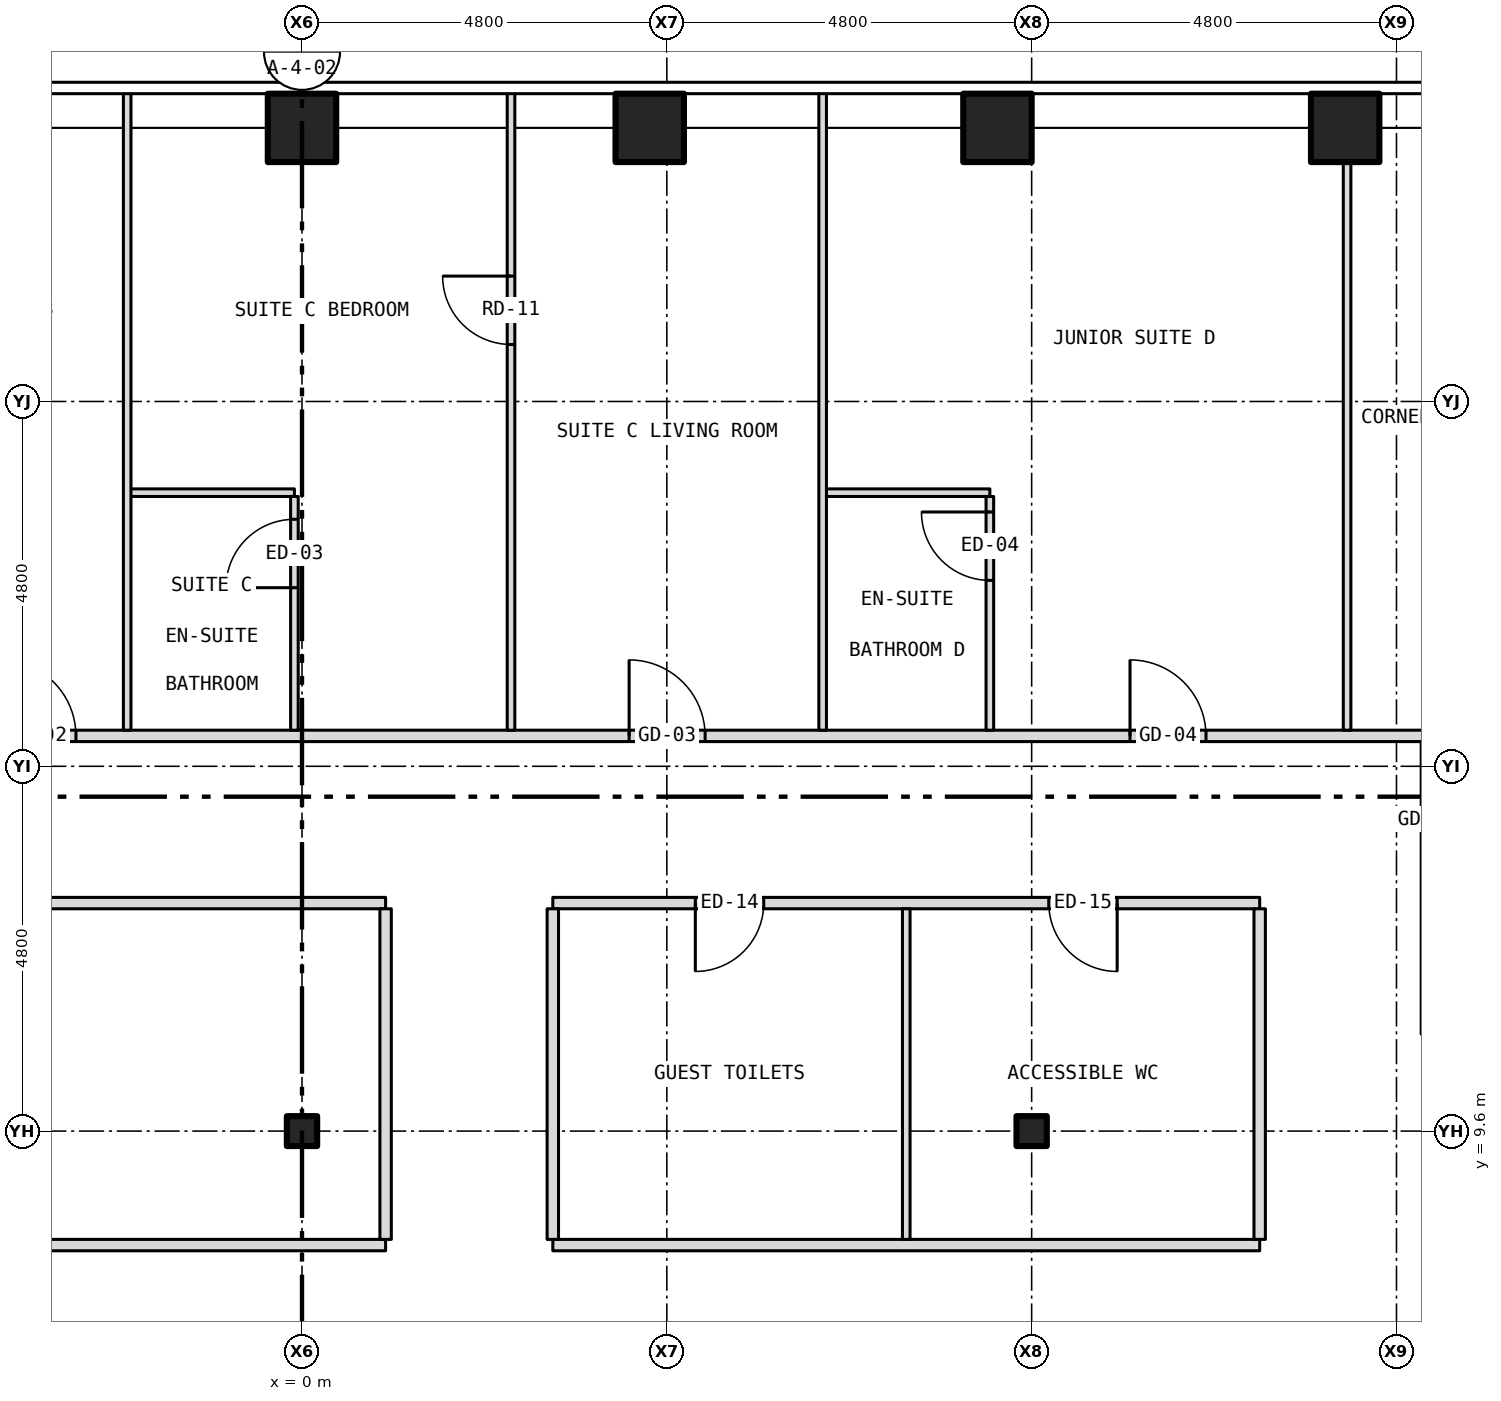
"""IFC4 building model, lengths in metres.
Left out: names, types, materials, properties, quantities, classifications, styles, units other than length and angle.
Written with IfcOpenShell. Run it as: python <this file> out.ifc"""

import sys

from ifc_helpers import new_model, si_unit, direction, frame, frame_2d, origin, origin_2d, place, context, subcontext, project, spatial, rectangle, hollow_rectangle, i_section, extrude, element, fill, save


model = new_model("IFC4")
c1 = context("Model", 3, precision=1e-05, world=origin(), true_north=direction((0.0, 1.0)))
c2 = subcontext(c1, "Body", "Model", "MODEL_VIEW")
j1 = project(units=[si_unit("LENGTHUNIT", "METRE"), si_unit("PLANEANGLEUNIT", "RADIAN")], contexts=[c1])
p1 = place(None, origin())
s1 = spatial("IfcSite", under=j1, at=p1, CompositionType="ELEMENT")
p2 = place(p1, origin())
s2 = spatial("IfcBuilding", under=s1, at=p2, CompositionType="ELEMENT")
p3 = place(p2, frame((0.0, 0.0, 92.5)))
s3 = spatial("IfcBuildingStorey", under=s2, at=p3, CompositionType="ELEMENT", Elevation=92.5)
for number, where, z_axis, x_axis in (
    (1, (0.0, 22.8, -0.15), (0.0, 0.0, 1.0), (1.0, 0.0, 0.0)),
    (2, (4.575, 22.8, -0.15), (0.0, 0.0, 1.0), (1.0, 0.0, 0.0)),
    (3, (9.15, 22.8, -0.15), (0.0, 0.0, 1.0), (1.0, 0.0, 0.0)),
    (4, (13.725, 22.8, -0.15), (0.0, 0.0, 1.0), (1.0, 0.0, 0.0)),
):
    element("IfcColumn", number, at=place(p3, frame(where, z_axis=z_axis, x_axis=x_axis)), inside=s3, PredefinedType="COLUMN", context=c2, shape_type="SweptSolid", body=[
        extrude(hollow_rectangle(XDim=0.9, YDim=0.9, WallThickness=0.05, at=origin_2d()), origin(), (0.0, 0.0, 1.0), 3.5),
    ])
for number, where, z_axis, x_axis in (
    (5, (0.0, 9.6, -0.15), (0.0, 0.0, 1.0), (1.0, 0.0, 0.0)),
    (6, (9.6, 9.6, -0.15), (0.0, 0.0, 1.0), (1.0, 0.0, 0.0)),
):
    element("IfcColumn", number, at=place(p3, frame(where, z_axis=z_axis, x_axis=x_axis)), inside=s3, PredefinedType="COLUMN", context=c2, shape_type="SweptSolid", body=[
        extrude(i_section(OverallWidth=0.399, OverallDepth=0.394, WebThickness=0.023, FlangeThickness=0.037, at=origin_2d()), origin(), (0.0, 0.0, 1.0), 3.5),
    ])
p4 = place(p3, frame((-12.6, 8.1, 0.0), z_axis=(0.0, 0.0, 1.0), x_axis=(1.0, 0.0, 0.0)))
e7 = element("IfcWall", 7, at=p4, inside=s3, PredefinedType="PARTITIONING", context=c2, shape_type="SweptSolid", body=[
    extrude(rectangle(XDim=13.7, YDim=0.15, at=frame_2d((6.85, 0.0))), origin(), (0.0, 0.0, 1.0), 3.35),
])
p5 = place(p4, frame((6.4, 0.0, 0.0)))
e8 = element("IfcOpeningElement", 8, at=p5, cuts=e7, PredefinedType="OPENING", context=c2, shape_type="SweptSolid", body=[
    extrude(rectangle(XDim=0.9, YDim=2.1, at=frame_2d((0.45, 1.05))), frame((0.0, 0.087, 0.0), z_axis=(0.0, -1.0, 0.0), x_axis=(1.0, 0.0, 0.0)), (0.0, 0.0, 1.0), 0.174),
])
p6 = place(p3, frame((3.3, 8.1, 0.0), z_axis=(0.0, 0.0, 1.0), x_axis=(1.0, 0.0, 0.0)))
e9 = element("IfcWall", 9, at=p6, inside=s3, PredefinedType="PARTITIONING", context=c2, shape_type="SweptSolid", body=[
    extrude(rectangle(XDim=9.3, YDim=0.15, at=frame_2d((4.65, 0.0))), origin(), (0.0, 0.0, 1.0), 3.35),
])
p7 = place(p3, frame((-12.6, 12.6, 0.0), z_axis=(0.0, 0.0, 1.0), x_axis=(1.0, 0.0, 0.0)))
e10 = element("IfcWall", 10, at=p7, inside=s3, PredefinedType="PARTITIONING", context=c2, shape_type="SweptSolid", body=[
    extrude(rectangle(XDim=13.7, YDim=0.15, at=frame_2d((6.85, 0.0))), origin(), (0.0, 0.0, 1.0), 3.35),
])
p8 = place(p3, frame((3.3, 12.6, 0.0), z_axis=(0.0, 0.0, 1.0), x_axis=(1.0, 0.0, 0.0)))
e11 = element("IfcWall", 11, at=p8, inside=s3, PredefinedType="PARTITIONING", context=c2, shape_type="SweptSolid", body=[
    extrude(rectangle(XDim=9.3, YDim=0.15, at=frame_2d((4.65, 0.0))), origin(), (0.0, 0.0, 1.0), 3.35),
])
p9 = place(p8, frame((1.875, 0.0, 0.0)))
e12 = element("IfcOpeningElement", 12, at=p9, cuts=e11, PredefinedType="OPENING", context=c2, shape_type="SweptSolid", body=[
    extrude(rectangle(XDim=0.9, YDim=2.1, at=frame_2d((0.45, 1.05))), frame((0.0, 0.087, 0.0), z_axis=(0.0, -1.0, 0.0), x_axis=(1.0, 0.0, 0.0)), (0.0, 0.0, 1.0), 0.174),
])
p10 = place(p8, frame((6.525, 0.0, 0.0)))
e13 = element("IfcOpeningElement", 13, at=p10, cuts=e11, PredefinedType="OPENING", context=c2, shape_type="SweptSolid", body=[
    extrude(rectangle(XDim=0.9, YDim=2.1, at=frame_2d((0.45, 1.05))), frame((0.0, 0.087, 0.0), z_axis=(0.0, -1.0, 0.0), x_axis=(1.0, 0.0, 0.0)), (0.0, 0.0, 1.0), 0.174),
])
p11 = place(p3, frame((-14.8, 14.8, 0.0), z_axis=(0.0, 0.0, 1.0), x_axis=(1.0, 0.0, 0.0)))
e14 = element("IfcWall", 14, at=p11, inside=s3, PredefinedType="PARTITIONING", context=c2, shape_type="SweptSolid", body=[
    extrude(rectangle(XDim=29.6, YDim=0.15, at=frame_2d((14.8, 0.0))), origin(), (0.0, 0.0, 1.0), 3.35),
])
p12 = place(p11, frame((5.107, 0.0, 0.0)))
e15 = element("IfcOpeningElement", 15, at=p12, cuts=e14, PredefinedType="OPENING", context=c2, shape_type="SweptSolid", body=[
    extrude(rectangle(XDim=1.0, YDim=2.1, at=frame_2d((0.5, 1.05))), frame((0.0, 0.087, 0.0), z_axis=(0.0, -1.0, 0.0), x_axis=(1.0, 0.0, 0.0)), (0.0, 0.0, 1.0), 0.174),
])
p13 = place(p11, frame((10.826, 0.0, 0.0)))
e16 = element("IfcOpeningElement", 16, at=p13, cuts=e14, PredefinedType="OPENING", context=c2, shape_type="SweptSolid", body=[
    extrude(rectangle(XDim=1.0, YDim=2.1, at=frame_2d((0.5, 1.05))), frame((0.0, 0.087, 0.0), z_axis=(0.0, -1.0, 0.0), x_axis=(1.0, 0.0, 0.0)), (0.0, 0.0, 1.0), 0.174),
])
p14 = place(p11, frame((19.104, 0.0, 0.0)))
e17 = element("IfcOpeningElement", 17, at=p14, cuts=e14, PredefinedType="OPENING", context=c2, shape_type="SweptSolid", body=[
    extrude(rectangle(XDim=1.0, YDim=2.1, at=frame_2d((0.5, 1.05))), frame((0.0, 0.087, 0.0), z_axis=(0.0, -1.0, 0.0), x_axis=(1.0, 0.0, 0.0)), (0.0, 0.0, 1.0), 0.174),
])
p15 = place(p11, frame((25.694, 0.0, 0.0)))
e18 = element("IfcOpeningElement", 18, at=p15, cuts=e14, PredefinedType="OPENING", context=c2, shape_type="SweptSolid", body=[
    extrude(rectangle(XDim=1.0, YDim=2.1, at=frame_2d((0.5, 1.05))), frame((0.0, 0.087, 0.0), z_axis=(0.0, -1.0, 0.0), x_axis=(1.0, 0.0, 0.0)), (0.0, 0.0, 1.0), 0.174),
])
for number, where, z_axis, x_axis in (
    (19, (-2.3, 18.0, 0.0), (0.0, 0.0, 1.0), (1.0, 0.0, 0.0)),
    (20, (6.85, 18.0, 0.0), (0.0, 0.0, 1.0), (1.0, 0.0, 0.0)),
):
    element("IfcWall", number, at=place(p3, frame(where, z_axis=z_axis, x_axis=x_axis)), inside=s3, PredefinedType="PARTITIONING", context=c2, shape_type="SweptSolid", body=[
        extrude(rectangle(XDim=2.2, YDim=0.1, at=frame_2d((1.1, 0.0))), origin(), (0.0, 0.0, 1.0), 3.35),
    ])
p16 = place(p3, frame((-2.3, 14.875, 0.0), z_axis=(0.0, 0.0, 1.0), x_axis=(0.0, 1.0, 0.0)))
e21 = element("IfcWall", 21, at=p16, inside=s3, PredefinedType="PARTITIONING", context=c2, shape_type="SweptSolid", body=[
    extrude(rectangle(XDim=8.405, YDim=0.1, at=frame_2d((4.203, 0.0))), origin(), (0.0, 0.0, 1.0), 3.35),
])
p17 = place(p3, frame((-0.1, 14.875, 0.0), z_axis=(0.0, 0.0, 1.0), x_axis=(0.0, 1.0, 0.0)))
e22 = element("IfcWall", 22, at=p17, inside=s3, PredefinedType="PARTITIONING", context=c2, shape_type="SweptSolid", body=[
    extrude(rectangle(XDim=3.075, YDim=0.1, at=frame_2d((1.538, 0.0))), origin(), (0.0, 0.0, 1.0), 2.728),
])
p18 = place(p17, frame((1.875, 0.0, 0.0)))
e23 = element("IfcOpeningElement", 23, at=p18, cuts=e22, PredefinedType="OPENING", context=c2, shape_type="SweptSolid", body=[
    extrude(rectangle(XDim=0.9, YDim=2.1, at=frame_2d((0.45, 1.05))), frame((0.0, 0.062, 0.0), z_axis=(0.0, -1.0, 0.0), x_axis=(1.0, 0.0, 0.0)), (0.0, 0.0, 1.0), 0.124),
])
p19 = place(p3, frame((1.1, 8.175, 0.0), z_axis=(0.0, 0.0, 1.0), x_axis=(0.0, 1.0, 0.0)))
e24 = element("IfcWall", 24, at=p19, inside=s3, PredefinedType="PARTITIONING", context=c2, shape_type="SweptSolid", body=[
    extrude(rectangle(XDim=4.35, YDim=0.15, at=frame_2d((2.175, 0.0))), origin(), (0.0, 0.0, 1.0), 3.35),
])
p20 = place(p3, frame((2.75, 14.875, 0.0), z_axis=(0.0, 0.0, 1.0), x_axis=(0.0, 1.0, 0.0)))
e25 = element("IfcWall", 25, at=p20, inside=s3, PredefinedType="PARTITIONING", context=c2, shape_type="SweptSolid", body=[
    extrude(rectangle(XDim=8.405, YDim=0.1, at=frame_2d((4.203, 0.0))), origin(), (0.0, 0.0, 1.0), 3.35),
])
p21 = place(p20, frame((5.075, 0.0, 0.0)))
e26 = element("IfcOpeningElement", 26, at=p21, cuts=e25, PredefinedType="OPENING", context=c2, shape_type="SweptSolid", body=[
    extrude(rectangle(XDim=0.9, YDim=2.1, at=frame_2d((0.45, 1.05))), frame((0.0, 0.062, 0.0), z_axis=(0.0, -1.0, 0.0), x_axis=(1.0, 0.0, 0.0)), (0.0, 0.0, 1.0), 0.124),
])
p22 = place(p3, frame((3.3, 8.175, 0.0), z_axis=(0.0, 0.0, 1.0), x_axis=(0.0, 1.0, 0.0)))
e27 = element("IfcWall", 27, at=p22, inside=s3, PredefinedType="PARTITIONING", context=c2, shape_type="SweptSolid", body=[
    extrude(rectangle(XDim=4.35, YDim=0.15, at=frame_2d((2.175, 0.0))), origin(), (0.0, 0.0, 1.0), 3.35),
])
p23 = place(p3, frame((6.85, 14.875, 0.0), z_axis=(0.0, 0.0, 1.0), x_axis=(0.0, 1.0, 0.0)))
e28 = element("IfcWall", 28, at=p23, inside=s3, PredefinedType="PARTITIONING", context=c2, shape_type="SweptSolid", body=[
    extrude(rectangle(XDim=8.405, YDim=0.1, at=frame_2d((4.203, 0.0))), origin(), (0.0, 0.0, 1.0), 3.35),
])
p24 = place(p3, frame((7.95, 8.175, 0.0), z_axis=(0.0, 0.0, 1.0), x_axis=(0.0, 1.0, 0.0)))
e29 = element("IfcWall", 29, at=p24, inside=s3, PredefinedType="PARTITIONING", context=c2, shape_type="SweptSolid", body=[
    extrude(rectangle(XDim=4.35, YDim=0.1, at=frame_2d((2.175, 0.0))), origin(), (0.0, 0.0, 1.0), 3.35),
])
p25 = place(p3, frame((9.05, 14.875, 0.0), z_axis=(0.0, 0.0, 1.0), x_axis=(0.0, 1.0, 0.0)))
e30 = element("IfcWall", 30, at=p25, inside=s3, PredefinedType="PARTITIONING", context=c2, shape_type="SweptSolid", body=[
    extrude(rectangle(XDim=3.075, YDim=0.1, at=frame_2d((1.538, 0.0))), origin(), (0.0, 0.0, 1.0), 3.35),
])
p26 = place(p25, frame((1.971, 0.0, 0.0)))
e31 = element("IfcOpeningElement", 31, at=p26, cuts=e30, PredefinedType="OPENING", context=c2, shape_type="SweptSolid", body=[
    extrude(rectangle(XDim=0.9, YDim=2.1, at=frame_2d((0.45, 1.05))), frame((0.0, 0.062, 0.0), z_axis=(0.0, -1.0, 0.0), x_axis=(1.0, 0.0, 0.0)), (0.0, 0.0, 1.0), 0.124),
])
p27 = place(p3, frame((12.6, 8.175, 0.0), z_axis=(0.0, 0.0, 1.0), x_axis=(0.0, 1.0, 0.0)))
e32 = element("IfcWall", 32, at=p27, inside=s3, PredefinedType="PARTITIONING", context=c2, shape_type="SweptSolid", body=[
    extrude(rectangle(XDim=4.35, YDim=0.15, at=frame_2d((2.175, 0.0))), origin(), (0.0, 0.0, 1.0), 3.35),
])
p28 = place(p3, frame((13.75, 14.875, 0.0), z_axis=(0.0, 0.0, 1.0), x_axis=(0.0, 1.0, 0.0)))
e33 = element("IfcWall", 33, at=p28, inside=s3, PredefinedType="PARTITIONING", context=c2, shape_type="SweptSolid", body=[
    extrude(rectangle(XDim=7.805, YDim=0.1, at=frame_2d((3.902, 0.0))), origin(), (0.0, 0.0, 1.0), 3.35),
])
p29 = place(p13, origin())
e34 = element("IfcDoor", 34, at=p29, inside=s3, OperationType="SINGLE_SWING_LEFT", PredefinedType="DOOR", context=c2, shape_type="SweptSolid", body=[
    extrude(rectangle(XDim=1.0, YDim=2.1, at=frame_2d((0.5, 1.05))), frame((0.0, 0.025, 0.0), z_axis=(0.0, -1.0, 0.0), x_axis=(1.0, 0.0, 0.0)), (0.0, 0.0, 1.0), 0.05),
])
fill(e16, e34)
p30 = place(p14, origin())
e35 = element("IfcDoor", 35, at=p30, inside=s3, OperationType="SINGLE_SWING_LEFT", PredefinedType="DOOR", context=c2, shape_type="SweptSolid", body=[
    extrude(rectangle(XDim=1.0, YDim=2.1, at=frame_2d((0.5, 1.05))), frame((0.0, 0.025, 0.0), z_axis=(0.0, -1.0, 0.0), x_axis=(1.0, 0.0, 0.0)), (0.0, 0.0, 1.0), 0.05),
])
fill(e17, e35)
p31 = place(p21, origin())
e36 = element("IfcDoor", 36, at=p31, inside=s3, OperationType="SINGLE_SWING_RIGHT", PredefinedType="DOOR", context=c2, shape_type="SweptSolid", body=[
    extrude(rectangle(XDim=0.9, YDim=2.1, at=frame_2d((0.45, 1.05))), frame((0.0, 0.025, 0.0), z_axis=(0.0, -1.0, 0.0), x_axis=(1.0, 0.0, 0.0)), (0.0, 0.0, 1.0), 0.05),
])
fill(e26, e36)
p32 = place(p18, origin())
e37 = element("IfcDoor", 37, at=p32, inside=s3, OperationType="SINGLE_SWING_LEFT", PredefinedType="DOOR", context=c2, shape_type="SweptSolid", body=[
    extrude(rectangle(XDim=0.9, YDim=2.1, at=frame_2d((0.45, 1.05))), frame((0.0, 0.025, 0.0), z_axis=(0.0, -1.0, 0.0), x_axis=(1.0, 0.0, 0.0)), (0.0, 0.0, 1.0), 0.05),
])
fill(e23, e37)
p33 = place(p15, origin())
e38 = element("IfcDoor", 38, at=p33, inside=s3, OperationType="SINGLE_SWING_LEFT", PredefinedType="DOOR", context=c2, shape_type="SweptSolid", body=[
    extrude(rectangle(XDim=1.0, YDim=2.1, at=frame_2d((0.5, 1.05))), frame((0.0, 0.025, 0.0), z_axis=(0.0, -1.0, 0.0), x_axis=(1.0, 0.0, 0.0)), (0.0, 0.0, 1.0), 0.05),
])
fill(e18, e38)
p34 = place(p26, origin())
e39 = element("IfcDoor", 39, at=p34, inside=s3, OperationType="SINGLE_SWING_RIGHT", PredefinedType="DOOR", context=c2, shape_type="SweptSolid", body=[
    extrude(rectangle(XDim=0.9, YDim=2.1, at=frame_2d((0.45, 1.05))), frame((0.0, 0.025, 0.0), z_axis=(0.0, -1.0, 0.0), x_axis=(1.0, 0.0, 0.0)), (0.0, 0.0, 1.0), 0.05),
])
fill(e31, e39)
p35 = place(p9, origin())
e40 = element("IfcDoor", 40, at=p35, inside=s3, OperationType="SINGLE_SWING_LEFT", PredefinedType="DOOR", context=c2, shape_type="SweptSolid", body=[
    extrude(rectangle(XDim=0.9, YDim=2.1, at=frame_2d((0.45, 1.05))), frame((0.0, 0.025, 0.0), z_axis=(0.0, -1.0, 0.0), x_axis=(1.0, 0.0, 0.0)), (0.0, 0.0, 1.0), 0.05),
])
fill(e12, e40)
p36 = place(p10, origin())
e41 = element("IfcDoor", 41, at=p36, inside=s3, OperationType="SINGLE_SWING_RIGHT", PredefinedType="DOOR", context=c2, shape_type="SweptSolid", body=[
    extrude(rectangle(XDim=0.9, YDim=2.1, at=frame_2d((0.45, 1.05))), frame((0.0, 0.025, 0.0), z_axis=(0.0, -1.0, 0.0), x_axis=(1.0, 0.0, 0.0)), (0.0, 0.0, 1.0), 0.05),
])
fill(e13, e41)
save(model, sys.argv[1])
